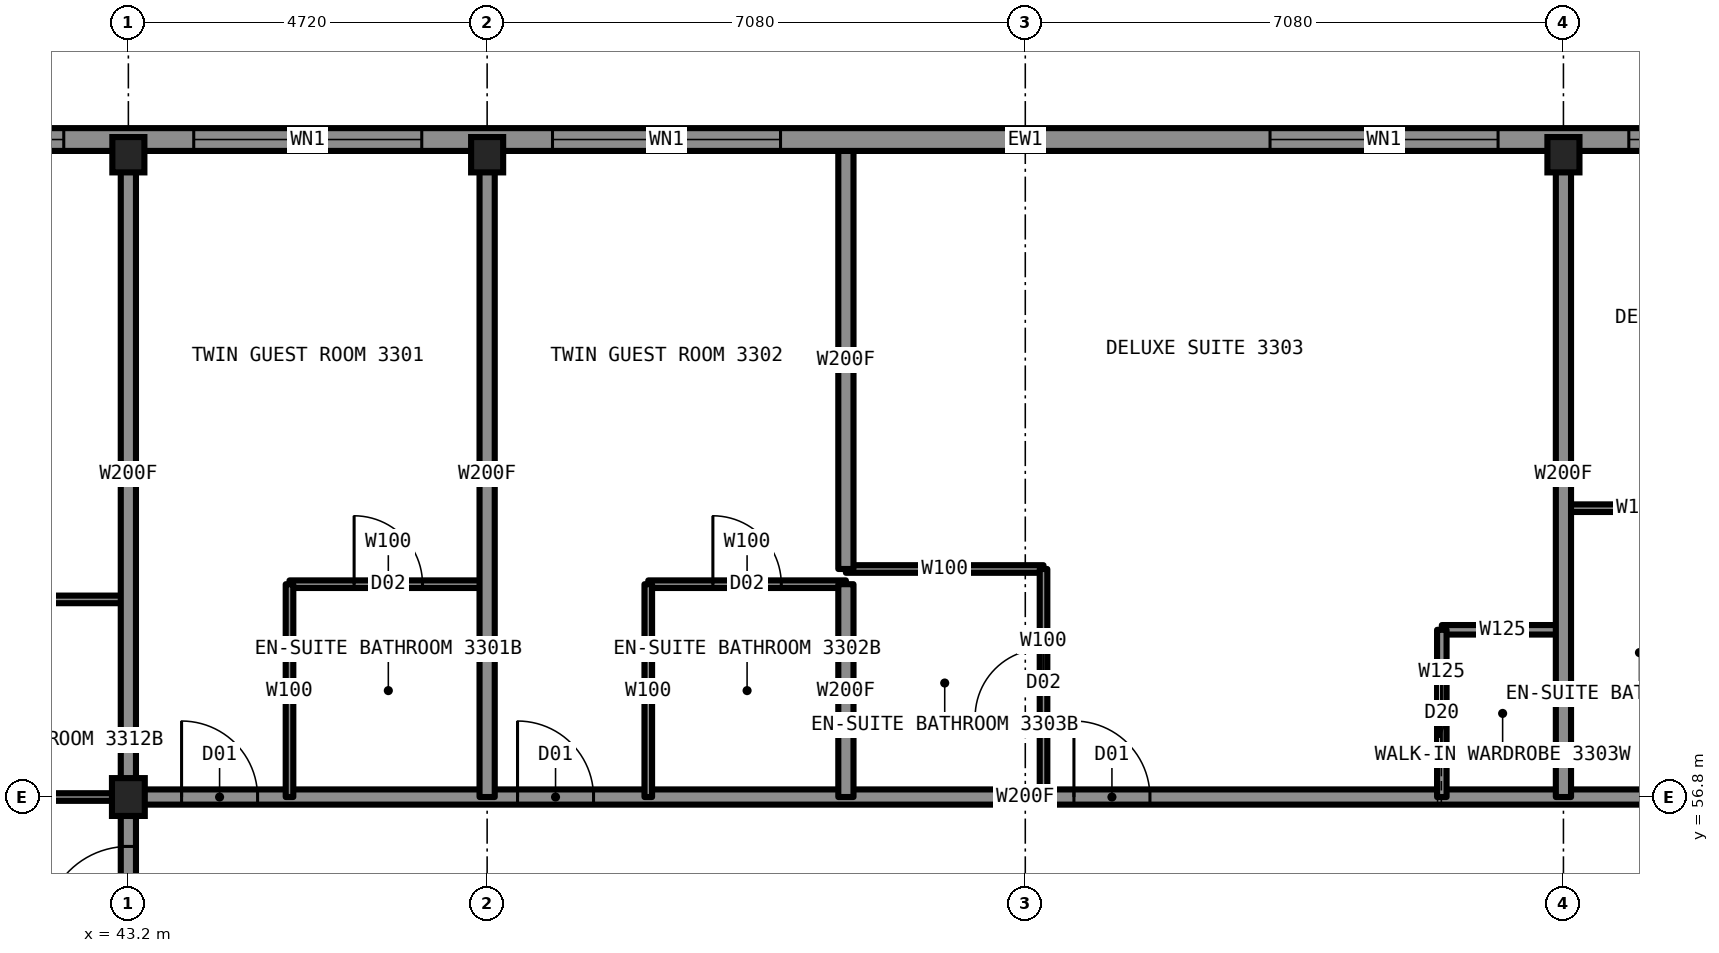
"""IFC4 building model, lengths in metres.
Left out: names, types, materials, properties, quantities, classifications, styles, units other than length and angle.
Written with IfcOpenShell. Run it as: python <this file> out.ifc"""

import sys

from ifc_helpers import new_model, si_unit, direction, frame, frame_2d, origin, origin_2d, place, context, subcontext, project, spatial, rectangle, i_section, extrude, element, fill, save


model = new_model("IFC4")
c1 = context("Model", 3, precision=1e-05, world=origin(), true_north=direction((0.0, 1.0)))
c2 = subcontext(c1, "Body", "Model", "MODEL_VIEW")
j1 = project(units=[si_unit("LENGTHUNIT", "METRE"), si_unit("PLANEANGLEUNIT", "RADIAN")], contexts=[c1])
p1 = place(None, origin())
s1 = spatial("IfcSite", under=j1, at=p1, CompositionType="ELEMENT")
p2 = place(p1, origin())
s2 = spatial("IfcBuilding", under=s1, at=p2, CompositionType="ELEMENT")
p3 = place(p2, frame((0.0, 0.0, 124.9)))
s3 = spatial("IfcBuildingStorey", under=s2, at=p3, CompositionType="ELEMENT", Elevation=124.9)
for number, where, z_axis, x_axis in (
    (1, (43.2, 65.25, 0.0), (0.0, 0.0, 1.0), (1.0, 0.0, 0.0)),
    (2, (47.92, 65.25, 0.0), (0.0, 0.0, 1.0), (1.0, 0.0, 0.0)),
    (3, (62.08, 65.25, 0.0), (0.0, 0.0, 1.0), (1.0, 0.0, 0.0)),
):
    element("IfcColumn", number, at=place(p3, frame(where, z_axis=z_axis, x_axis=x_axis)), inside=s3, PredefinedType="COLUMN", context=c2, shape_type="SweptSolid", body=[
        extrude(i_section(OverallWidth=0.422, OverallDepth=0.465, WebThickness=0.045, FlangeThickness=0.073, at=origin_2d()), origin(), (0.0, 0.0, 1.0), 3.5),
    ])
p4 = place(p3, frame((43.2, 56.8, 0.0), z_axis=(0.0, 0.0, 1.0), x_axis=(1.0, 0.0, 0.0)))
e4 = element("IfcColumn", 4, at=p4, inside=s3, PredefinedType="COLUMN", context=c2, shape_type="SweptSolid", body=[
    extrude(i_section(OverallWidth=0.432, OverallDepth=0.498, WebThickness=0.056, FlangeThickness=0.089, at=origin_2d()), origin(), (0.0, 0.0, 1.0), 3.5),
])
p5 = place(p3, frame((40.6, 56.8, 0.0), z_axis=(0.0, 0.0, 1.0), x_axis=(1.0, 0.0, 0.0)))
e5 = element("IfcWall", 5, at=p5, inside=s3, PredefinedType="PARTITIONING", context=c2, shape_type="SweptSolid", body=[
    extrude(rectangle(XDim=2.6, YDim=0.1, at=frame_2d((1.3, 0.0))), origin(), (0.0, 0.0, 1.0), 2.573),
])
p6 = place(p3, frame((43.2, 56.8, 0.0), z_axis=(0.0, 0.0, 1.0), x_axis=(1.0, 0.0, 0.0)))
e6 = element("IfcWall", 6, at=p6, inside=s3, PredefinedType="PARTITIONING", context=c2, shape_type="SweptSolid", body=[
    extrude(rectangle(XDim=23.6, YDim=0.2, at=frame_2d((11.8, 0.0))), origin(), (0.0, 0.0, 1.0), 3.33),
])
p7 = place(p6, frame((0.7, 0.0, 0.0)))
e7 = element("IfcOpeningElement", 7, at=p7, cuts=e6, PredefinedType="OPENING", context=c2, shape_type="SweptSolid", body=[
    extrude(rectangle(XDim=1.0, YDim=2.2, at=frame_2d((0.5, 1.1))), frame((0.0, 0.11, 0.0), z_axis=(0.0, -1.0, 0.0), x_axis=(1.0, 0.0, 0.0)), (0.0, 0.0, 1.0), 0.22),
])
p8 = place(p6, frame((5.12, 0.0, 0.0)))
e8 = element("IfcOpeningElement", 8, at=p8, cuts=e6, PredefinedType="OPENING", context=c2, shape_type="SweptSolid", body=[
    extrude(rectangle(XDim=1.0, YDim=2.2, at=frame_2d((0.5, 1.1))), frame((0.0, 0.11, 0.0), z_axis=(0.0, -1.0, 0.0), x_axis=(1.0, 0.0, 0.0)), (0.0, 0.0, 1.0), 0.22),
])
p9 = place(p6, frame((12.44, 0.0, 0.0)))
e9 = element("IfcOpeningElement", 9, at=p9, cuts=e6, PredefinedType="OPENING", context=c2, shape_type="SweptSolid", body=[
    extrude(rectangle(XDim=1.0, YDim=2.2, at=frame_2d((0.5, 1.1))), frame((0.0, 0.11, 0.0), z_axis=(0.0, -1.0, 0.0), x_axis=(1.0, 0.0, 0.0)), (0.0, 0.0, 1.0), 0.22),
])
p10 = place(p6, frame((21.14, 0.0, 0.0)))
e10 = element("IfcOpeningElement", 10, at=p10, cuts=e6, PredefinedType="OPENING", context=c2, shape_type="SweptSolid", body=[
    extrude(rectangle(XDim=1.0, YDim=2.2, at=frame_2d((0.5, 1.1))), frame((0.0, 0.11, 0.0), z_axis=(0.0, -1.0, 0.0), x_axis=(1.0, 0.0, 0.0)), (0.0, 0.0, 1.0), 0.22),
])
p11 = place(p3, frame((60.48, 59.0, 0.0), z_axis=(0.0, 0.0, 1.0), x_axis=(1.0, 0.0, 0.0)))
e11 = element("IfcWall", 11, at=p11, inside=s3, PredefinedType="PARTITIONING", context=c2, shape_type="SweptSolid", body=[
    extrude(rectangle(XDim=1.6, YDim=0.125, at=frame_2d((0.8, 0.0))), origin(), (0.0, 0.0, 1.0), 3.33),
])
p12 = place(p3, frame((40.6, 59.4, 0.0), z_axis=(0.0, 0.0, 1.0), x_axis=(1.0, 0.0, 0.0)))
e12 = element("IfcWall", 12, at=p12, inside=s3, PredefinedType="PARTITIONING", context=c2, shape_type="SweptSolid", body=[
    extrude(rectangle(XDim=2.6, YDim=0.1, at=frame_2d((1.3, 0.0))), origin(), (0.0, 0.0, 1.0), 3.33),
])
p13 = place(p3, frame((45.32, 59.6, 0.0), z_axis=(0.0, 0.0, 1.0), x_axis=(1.0, 0.0, 0.0)))
e13 = element("IfcWall", 13, at=p13, inside=s3, PredefinedType="PARTITIONING", context=c2, shape_type="SweptSolid", body=[
    extrude(rectangle(XDim=2.6, YDim=0.1, at=frame_2d((1.3, 0.0))), origin(), (0.0, 0.0, 1.0), 3.33),
])
p14 = place(p13, frame((0.85, 0.0, 0.0)))
e14 = element("IfcOpeningElement", 14, at=p14, cuts=e13, PredefinedType="OPENING", context=c2, shape_type="SweptSolid", body=[
    extrude(rectangle(XDim=0.9, YDim=2.1, at=frame_2d((0.45, 1.05))), frame((0.0, 0.06, 0.0), z_axis=(0.0, -1.0, 0.0), x_axis=(1.0, 0.0, 0.0)), (0.0, 0.0, 1.0), 0.12),
])
p15 = place(p3, frame((50.04, 59.6, 0.0), z_axis=(0.0, 0.0, 1.0), x_axis=(1.0, 0.0, 0.0)))
e15 = element("IfcWall", 15, at=p15, inside=s3, PredefinedType="PARTITIONING", context=c2, shape_type="SweptSolid", body=[
    extrude(rectangle(XDim=2.6, YDim=0.1, at=frame_2d((1.3, 0.0))), origin(), (0.0, 0.0, 1.0), 3.33),
])
p16 = place(p15, frame((0.85, 0.0, 0.0)))
e16 = element("IfcOpeningElement", 16, at=p16, cuts=e15, PredefinedType="OPENING", context=c2, shape_type="SweptSolid", body=[
    extrude(rectangle(XDim=0.9, YDim=2.1, at=frame_2d((0.45, 1.05))), frame((0.0, 0.06, 0.0), z_axis=(0.0, -1.0, 0.0), x_axis=(1.0, 0.0, 0.0)), (0.0, 0.0, 1.0), 0.12),
])
p17 = place(p3, frame((52.64, 59.8, 0.0), z_axis=(0.0, 0.0, 1.0), x_axis=(1.0, 0.0, 0.0)))
e17 = element("IfcWall", 17, at=p17, inside=s3, PredefinedType="PARTITIONING", context=c2, shape_type="SweptSolid", body=[
    extrude(rectangle(XDim=2.6, YDim=0.1, at=frame_2d((1.3, 0.0))), origin(), (0.0, 0.0, 1.0), 3.33),
])
p18 = place(p3, frame((62.08, 60.6, 0.0), z_axis=(0.0, 0.0, 1.0), x_axis=(1.0, 0.0, 0.0)))
e18 = element("IfcWall", 18, at=p18, inside=s3, PredefinedType="PARTITIONING", context=c2, shape_type="SweptSolid", body=[
    extrude(rectangle(XDim=2.0, YDim=0.1, at=frame_2d((1.0, 0.0))), origin(), (0.0, 0.0, 1.0), 3.33),
])
p19 = place(p3, frame((43.2, 33.22, 0.0), z_axis=(0.0, 0.0, 1.0), x_axis=(0.0, 1.0, 0.0)))
e19 = element("IfcWall", 19, at=p19, inside=s3, PredefinedType="PARTITIONING", context=c2, shape_type="SweptSolid", body=[
    extrude(rectangle(XDim=23.58, YDim=0.2, at=frame_2d((11.79, 0.0))), origin(), (0.0, 0.0, 1.0), 3.33),
])
p20 = place(p19, frame((6.16, 0.0, 0.0)))
e20 = element("IfcOpeningElement", 20, at=p20, cuts=e19, PredefinedType="OPENING", context=c2, shape_type="SweptSolid", body=[
    extrude(rectangle(XDim=1.0, YDim=2.2, at=frame_2d((0.5, 1.1))), frame((0.0, 0.11, 0.0), z_axis=(0.0, -1.0, 0.0), x_axis=(1.0, 0.0, 0.0)), (0.0, 0.0, 1.0), 0.22),
])
p21 = place(p19, frame((12.42, 0.0, 0.0)))
e21 = element("IfcOpeningElement", 21, at=p21, cuts=e19, PredefinedType="OPENING", context=c2, shape_type="SweptSolid", body=[
    extrude(rectangle(XDim=1.0, YDim=2.2, at=frame_2d((0.5, 1.1))), frame((0.0, 0.11, 0.0), z_axis=(0.0, -1.0, 0.0), x_axis=(1.0, 0.0, 0.0)), (0.0, 0.0, 1.0), 0.22),
])
p22 = place(p19, frame((21.83, 0.0, 0.0)))
e22 = element("IfcOpeningElement", 22, at=p22, cuts=e19, PredefinedType="OPENING", context=c2, shape_type="SweptSolid", body=[
    extrude(rectangle(XDim=1.1, YDim=2.2, at=frame_2d((0.55, 1.1))), frame((0.0, 0.11, 0.0), z_axis=(0.0, -1.0, 0.0), x_axis=(1.0, 0.0, 0.0)), (0.0, 0.0, 1.0), 0.22),
])
p23 = place(p19, frame((0.63, 0.0, 0.0)))
e23 = element("IfcOpeningElement", 23, at=p23, cuts=e19, PredefinedType="OPENING", context=c2, shape_type="SweptSolid", body=[
    extrude(rectangle(XDim=1.1, YDim=2.2, at=frame_2d((0.55, 1.1))), frame((0.0, 0.11, 0.0), z_axis=(0.0, -1.0, 0.0), x_axis=(1.0, 0.0, 0.0)), (0.0, 0.0, 1.0), 0.22),
])
p24 = place(p3, frame((43.2, 56.8, 0.0), z_axis=(0.0, 0.0, 1.0), x_axis=(0.0, 1.0, 0.0)))
e24 = element("IfcWall", 24, at=p24, inside=s3, PredefinedType="PARTITIONING", context=c2, shape_type="SweptSolid", body=[
    extrude(rectangle(XDim=8.5, YDim=0.2, at=frame_2d((4.25, 0.0))), origin(), (0.0, 0.0, 1.0), 2.573),
])
p25 = place(p3, frame((52.64, 56.8, 0.0), z_axis=(0.0, 0.0, 1.0), x_axis=(0.0, 1.0, 0.0)))
e25 = element("IfcWall", 25, at=p25, inside=s3, PredefinedType="PARTITIONING", context=c2, shape_type="SweptSolid", body=[
    extrude(rectangle(XDim=2.8, YDim=0.2, at=frame_2d((1.4, 0.0))), origin(), (0.0, 0.0, 1.0), 3.33),
])
p26 = place(p3, frame((52.64, 59.8, 0.0), z_axis=(0.0, 0.0, 1.0), x_axis=(0.0, 1.0, 0.0)))
e26 = element("IfcWall", 26, at=p26, inside=s3, PredefinedType="PARTITIONING", context=c2, shape_type="SweptSolid", body=[
    extrude(rectangle(XDim=5.5, YDim=0.2, at=frame_2d((2.75, 0.0))), origin(), (0.0, 0.0, 1.0), 3.33),
])
p27 = place(p3, frame((50.04, 56.8, 0.0), z_axis=(0.0, 0.0, 1.0), x_axis=(0.0, 1.0, 0.0)))
e27 = element("IfcWall", 27, at=p27, inside=s3, PredefinedType="PARTITIONING", context=c2, shape_type="SweptSolid", body=[
    extrude(rectangle(XDim=2.8, YDim=0.1, at=frame_2d((1.4, 0.0))), origin(), (0.0, 0.0, 1.0), 3.33),
])
p28 = place(p3, frame((47.92, 56.8, 0.0), z_axis=(0.0, 0.0, 1.0), x_axis=(0.0, 1.0, 0.0)))
e28 = element("IfcWall", 28, at=p28, inside=s3, PredefinedType="PARTITIONING", context=c2, shape_type="SweptSolid", body=[
    extrude(rectangle(XDim=8.5, YDim=0.2, at=frame_2d((4.25, 0.0))), origin(), (0.0, 0.0, 1.0), 2.573),
])
p29 = place(p3, frame((45.32, 56.8, 0.0), z_axis=(0.0, 0.0, 1.0), x_axis=(0.0, 1.0, 0.0)))
e29 = element("IfcWall", 29, at=p29, inside=s3, PredefinedType="PARTITIONING", context=c2, shape_type="SweptSolid", body=[
    extrude(rectangle(XDim=2.8, YDim=0.1, at=frame_2d((1.4, 0.0))), origin(), (0.0, 0.0, 1.0), 3.33),
])
p30 = place(p3, frame((55.24, 56.8, 0.0), z_axis=(0.0, 0.0, 1.0), x_axis=(0.0, 1.0, 0.0)))
e30 = element("IfcWall", 30, at=p30, inside=s3, PredefinedType="PARTITIONING", context=c2, shape_type="SweptSolid", body=[
    extrude(rectangle(XDim=3.0, YDim=0.1, at=frame_2d((1.5, 0.0))), origin(), (0.0, 0.0, 1.0), 3.33),
])
p31 = place(p30, frame((1.05, 0.0, 0.0)))
e31 = element("IfcOpeningElement", 31, at=p31, cuts=e30, PredefinedType="OPENING", context=c2, shape_type="SweptSolid", body=[
    extrude(rectangle(XDim=0.9, YDim=2.1, at=frame_2d((0.45, 1.05))), frame((0.0, 0.06, 0.0), z_axis=(0.0, -1.0, 0.0), x_axis=(1.0, 0.0, 0.0)), (0.0, 0.0, 1.0), 0.12),
])
p32 = place(p3, frame((60.48, 56.8, 0.0), z_axis=(0.0, 0.0, 1.0), x_axis=(0.0, 1.0, 0.0)))
e32 = element("IfcWall", 32, at=p32, inside=s3, PredefinedType="PARTITIONING", context=c2, shape_type="SweptSolid", body=[
    extrude(rectangle(XDim=2.2, YDim=0.125, at=frame_2d((1.1, 0.0))), origin(), (0.0, 0.0, 1.0), 3.33),
])
p33 = place(p32, frame((0.7, 0.0, 0.0)))
e33 = element("IfcOpeningElement", 33, at=p33, cuts=e32, PredefinedType="OPENING", context=c2, shape_type="SweptSolid", body=[
    extrude(rectangle(XDim=0.8, YDim=2.1, at=frame_2d((0.4, 1.05))), frame((0.0, 0.073, 0.0), z_axis=(0.0, -1.0, 0.0), x_axis=(1.0, 0.0, 0.0)), (0.0, 0.0, 1.0), 0.145),
])
p34 = place(p3, frame((62.08, 56.8, 0.0), z_axis=(0.0, 0.0, 1.0), x_axis=(0.0, 1.0, 0.0)))
e34 = element("IfcWall", 34, at=p34, inside=s3, PredefinedType="PARTITIONING", context=c2, shape_type="SweptSolid", body=[
    extrude(rectangle(XDim=8.5, YDim=0.2, at=frame_2d((4.25, 0.0))), origin(), (0.0, 0.0, 1.0), 2.573),
])
p35 = place(p3, frame((70.1, 65.45, 0.0), z_axis=(0.0, 0.0, 1.0), x_axis=(-1.0, 0.0, 0.0)))
e35 = element("IfcWall", 35, at=p35, inside=s3, PredefinedType="SOLIDWALL", context=c2, shape_type="SweptSolid", body=[
    extrude(rectangle(XDim=30.2, YDim=0.3, at=frame_2d((15.1, 0.0))), origin(), (0.0, 0.0, 1.0), 2.83),
])
p36 = place(p35, frame((0.85, 0.0, 0.5)))
e36 = element("IfcOpeningElement", 36, at=p36, cuts=e35, PredefinedType="OPENING", context=c2, shape_type="SweptSolid", body=[
    extrude(rectangle(XDim=1.6, YDim=2.0, at=frame_2d((0.8, 1.0))), frame((0.0, 0.16, 0.0), z_axis=(0.0, -1.0, 0.0), x_axis=(1.0, 0.0, 0.0)), (0.0, 0.0, 1.0), 0.32),
])
p37 = place(p35, frame((4.16, 0.0, 0.5)))
e37 = element("IfcOpeningElement", 37, at=p37, cuts=e35, PredefinedType="OPENING", context=c2, shape_type="SweptSolid", body=[
    extrude(rectangle(XDim=3.0, YDim=2.0, at=frame_2d((1.5, 1.0))), frame((0.0, 0.16, 0.0), z_axis=(0.0, -1.0, 0.0), x_axis=(1.0, 0.0, 0.0)), (0.0, 0.0, 1.0), 0.32),
])
p38 = place(p35, frame((8.88, 0.0, 0.5)))
e38 = element("IfcOpeningElement", 38, at=p38, cuts=e35, PredefinedType="OPENING", context=c2, shape_type="SweptSolid", body=[
    extrude(rectangle(XDim=3.0, YDim=2.0, at=frame_2d((1.5, 1.0))), frame((0.0, 0.16, 0.0), z_axis=(0.0, -1.0, 0.0), x_axis=(1.0, 0.0, 0.0)), (0.0, 0.0, 1.0), 0.32),
])
p39 = place(p35, frame((18.32, 0.0, 0.5)))
e39 = element("IfcOpeningElement", 39, at=p39, cuts=e35, PredefinedType="OPENING", context=c2, shape_type="SweptSolid", body=[
    extrude(rectangle(XDim=3.0, YDim=2.0, at=frame_2d((1.5, 1.0))), frame((0.0, 0.16, 0.0), z_axis=(0.0, -1.0, 0.0), x_axis=(1.0, 0.0, 0.0)), (0.0, 0.0, 1.0), 0.32),
])
p40 = place(p35, frame((23.04, 0.0, 0.5)))
e40 = element("IfcOpeningElement", 40, at=p40, cuts=e35, PredefinedType="OPENING", context=c2, shape_type="SweptSolid", body=[
    extrude(rectangle(XDim=3.0, YDim=2.0, at=frame_2d((1.5, 1.0))), frame((0.0, 0.16, 0.0), z_axis=(0.0, -1.0, 0.0), x_axis=(1.0, 0.0, 0.0)), (0.0, 0.0, 1.0), 0.32),
])
p41 = place(p35, frame((27.75, 0.0, 0.5)))
e41 = element("IfcOpeningElement", 41, at=p41, cuts=e35, PredefinedType="OPENING", context=c2, shape_type="SweptSolid", body=[
    extrude(rectangle(XDim=1.6, YDim=2.0, at=frame_2d((0.8, 1.0))), frame((0.0, 0.16, 0.0), z_axis=(0.0, -1.0, 0.0), x_axis=(1.0, 0.0, 0.0)), (0.0, 0.0, 1.0), 0.32),
])
p42 = place(p7, origin())
e42 = element("IfcDoor", 42, at=p42, inside=s3, OperationType="SINGLE_SWING_LEFT", PredefinedType="DOOR", context=c2, shape_type="SweptSolid", body=[
    extrude(rectangle(XDim=1.0, YDim=2.2, at=frame_2d((0.5, 1.1))), frame((0.0, 0.025, 0.0), z_axis=(0.0, -1.0, 0.0), x_axis=(1.0, 0.0, 0.0)), (0.0, 0.0, 1.0), 0.05),
])
fill(e7, e42)
p43 = place(p14, origin())
e43 = element("IfcDoor", 43, at=p43, inside=s3, OperationType="SINGLE_SWING_RIGHT", PredefinedType="DOOR", context=c2, shape_type="SweptSolid", body=[
    extrude(rectangle(XDim=0.9, YDim=2.1, at=frame_2d((0.45, 1.05))), frame((0.0, 0.025, 0.0), z_axis=(0.0, -1.0, 0.0), x_axis=(1.0, 0.0, 0.0)), (0.0, 0.0, 1.0), 0.05),
])
fill(e14, e43)
p44 = place(p8, origin())
e44 = element("IfcDoor", 44, at=p44, inside=s3, OperationType="SINGLE_SWING_LEFT", PredefinedType="DOOR", context=c2, shape_type="SweptSolid", body=[
    extrude(rectangle(XDim=1.0, YDim=2.2, at=frame_2d((0.5, 1.1))), frame((0.0, 0.025, 0.0), z_axis=(0.0, -1.0, 0.0), x_axis=(1.0, 0.0, 0.0)), (0.0, 0.0, 1.0), 0.05),
])
fill(e8, e44)
p45 = place(p16, origin())
e45 = element("IfcDoor", 45, at=p45, inside=s3, OperationType="SINGLE_SWING_RIGHT", PredefinedType="DOOR", context=c2, shape_type="SweptSolid", body=[
    extrude(rectangle(XDim=0.9, YDim=2.1, at=frame_2d((0.45, 1.05))), frame((0.0, 0.025, 0.0), z_axis=(0.0, -1.0, 0.0), x_axis=(1.0, 0.0, 0.0)), (0.0, 0.0, 1.0), 0.05),
])
fill(e16, e45)
p46 = place(p9, origin())
e46 = element("IfcDoor", 46, at=p46, inside=s3, OperationType="SINGLE_SWING_LEFT", PredefinedType="DOOR", context=c2, shape_type="SweptSolid", body=[
    extrude(rectangle(XDim=1.0, YDim=2.2, at=frame_2d((0.5, 1.1))), frame((0.0, 0.025, 0.0), z_axis=(0.0, -1.0, 0.0), x_axis=(1.0, 0.0, 0.0)), (0.0, 0.0, 1.0), 0.05),
])
fill(e9, e46)
p47 = place(p31, origin())
e47 = element("IfcDoor", 47, at=p47, inside=s3, OperationType="SINGLE_SWING_RIGHT", PredefinedType="DOOR", context=c2, shape_type="SweptSolid", body=[
    extrude(rectangle(XDim=0.9, YDim=2.1, at=frame_2d((0.45, 1.05))), frame((0.0, 0.025, 0.0), z_axis=(0.0, -1.0, 0.0), x_axis=(1.0, 0.0, 0.0)), (0.0, 0.0, 1.0), 0.05),
])
fill(e31, e47)
p48 = place(p33, origin())
e48 = element("IfcDoor", 48, at=p48, inside=s3, OperationType="SLIDING_TO_LEFT", PredefinedType="DOOR", context=c2, shape_type="SweptSolid", body=[
    extrude(rectangle(XDim=0.8, YDim=2.1, at=frame_2d((0.4, 1.05))), frame((0.0, 0.025, 0.0), z_axis=(0.0, -1.0, 0.0), x_axis=(1.0, 0.0, 0.0)), (0.0, 0.0, 1.0), 0.05),
])
fill(e33, e48)
p49 = place(p22, origin())
e49 = element("IfcDoor", 49, at=p49, inside=s3, OperationType="SINGLE_SWING_LEFT", PredefinedType="DOOR", context=c2, shape_type="SweptSolid", body=[
    extrude(rectangle(XDim=1.1, YDim=2.2, at=frame_2d((0.55, 1.1))), frame((0.0, 0.025, 0.0), z_axis=(0.0, -1.0, 0.0), x_axis=(1.0, 0.0, 0.0)), (0.0, 0.0, 1.0), 0.05),
])
fill(e22, e49)
p50 = place(p37, origin())
e50 = element("IfcWindow", 50, at=p50, inside=s3, PartitioningType="SINGLE_PANEL", PredefinedType="WINDOW", context=c2, shape_type="SweptSolid", body=[
    extrude(rectangle(XDim=3.0, YDim=2.0, at=frame_2d((1.5, 1.0))), frame((0.0, 0.03, 0.0), z_axis=(0.0, -1.0, 0.0), x_axis=(1.0, 0.0, 0.0)), (0.0, 0.0, 1.0), 0.06),
])
fill(e37, e50)
p51 = place(p38, origin())
e51 = element("IfcWindow", 51, at=p51, inside=s3, PartitioningType="SINGLE_PANEL", PredefinedType="WINDOW", context=c2, shape_type="SweptSolid", body=[
    extrude(rectangle(XDim=3.0, YDim=2.0, at=frame_2d((1.5, 1.0))), frame((0.0, 0.03, 0.0), z_axis=(0.0, -1.0, 0.0), x_axis=(1.0, 0.0, 0.0)), (0.0, 0.0, 1.0), 0.06),
])
fill(e38, e51)
p52 = place(p39, origin())
e52 = element("IfcWindow", 52, at=p52, inside=s3, PartitioningType="SINGLE_PANEL", PredefinedType="WINDOW", context=c2, shape_type="SweptSolid", body=[
    extrude(rectangle(XDim=3.0, YDim=2.0, at=frame_2d((1.5, 1.0))), frame((0.0, 0.03, 0.0), z_axis=(0.0, -1.0, 0.0), x_axis=(1.0, 0.0, 0.0)), (0.0, 0.0, 1.0), 0.06),
])
fill(e39, e52)
p53 = place(p40, origin())
e53 = element("IfcWindow", 53, at=p53, inside=s3, PartitioningType="SINGLE_PANEL", PredefinedType="WINDOW", context=c2, shape_type="SweptSolid", body=[
    extrude(rectangle(XDim=3.0, YDim=2.0, at=frame_2d((1.5, 1.0))), frame((0.0, 0.03, 0.0), z_axis=(0.0, -1.0, 0.0), x_axis=(1.0, 0.0, 0.0)), (0.0, 0.0, 1.0), 0.06),
])
fill(e40, e53)
p54 = place(p41, origin())
e54 = element("IfcWindow", 54, at=p54, inside=s3, PartitioningType="SINGLE_PANEL", PredefinedType="WINDOW", context=c2, shape_type="SweptSolid", body=[
    extrude(rectangle(XDim=1.6, YDim=2.0, at=frame_2d((0.8, 1.0))), frame((0.0, 0.03, 0.0), z_axis=(0.0, -1.0, 0.0), x_axis=(1.0, 0.0, 0.0)), (0.0, 0.0, 1.0), 0.06),
])
fill(e41, e54)
save(model, sys.argv[1])
